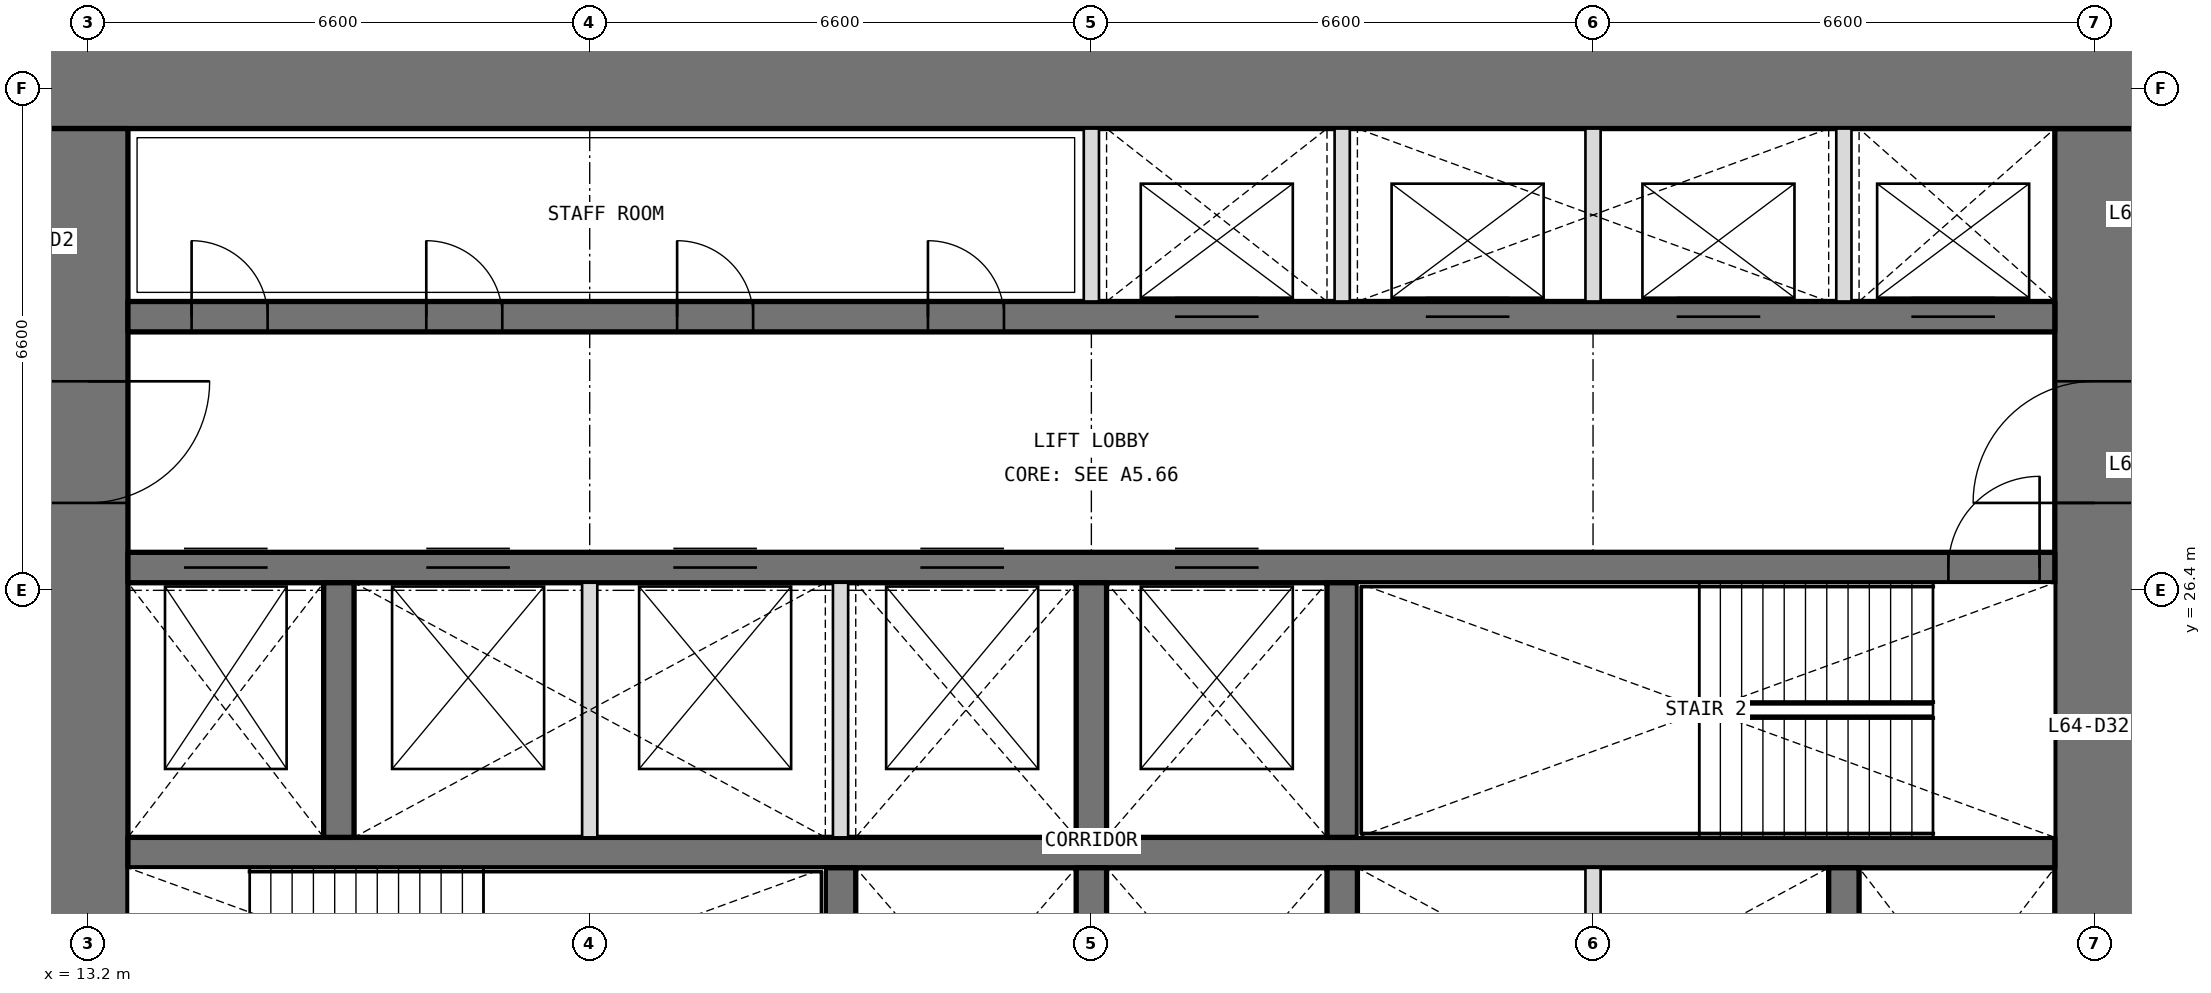
"""IFC4 building model, lengths in metres.
Left out: names, types, materials, properties, quantities, classifications, styles, units other than length and angle.
Written with IfcOpenShell. Run it as: python <this file> out.ifc"""

import sys

from ifc_helpers import new_model, si_unit, direction, frame, frame_2d, origin, place, context, subcontext, project, spatial, rectangle, extrude, element, fill, save


model = new_model("IFC4")
c1 = context("Model", 3, precision=1e-05, world=origin(), true_north=direction((0.0, 1.0)))
c2 = subcontext(c1, "Body", "Model", "MODEL_VIEW")
j1 = project(units=[si_unit("LENGTHUNIT", "METRE"), si_unit("PLANEANGLEUNIT", "RADIAN")], contexts=[c1])
p1 = place(None, origin())
s1 = spatial("IfcSite", under=j1, at=p1, CompositionType="ELEMENT")
p2 = place(p1, origin())
s2 = spatial("IfcBuilding", under=s1, at=p2, CompositionType="ELEMENT")
p3 = place(p2, frame((0.0, 0.0, 279.6)))
s3 = spatial("IfcBuildingStorey", under=s2, at=p3, CompositionType="ELEMENT", Elevation=279.6)
p4 = place(p3, frame((39.6, 13.725, 0.0), z_axis=(0.0, 0.0, 1.0), x_axis=(0.0, 1.0, 0.0)))
e1 = element("IfcWall", 1, at=p4, inside=s3, PredefinedType="SHEAR", context=c2, shape_type="SweptSolid", body=[
    extrude(rectangle(XDim=18.75, YDim=1.05, at=frame_2d((9.375, 0.0))), origin(), (0.0, 0.0, 1.0), 4.2),
])
p5 = place(p4, frame((3.025, 0.0, 0.0)))
e2 = element("IfcOpeningElement", 2, at=p5, cuts=e1, PredefinedType="OPENING", context=c2, shape_type="SweptSolid", body=[
    extrude(rectangle(XDim=1.6, YDim=2.1, at=frame_2d((0.8, 1.05))), frame((0.0, 0.535, 0.0), z_axis=(0.0, -1.0, 0.0), x_axis=(1.0, 0.0, 0.0)), (0.0, 0.0, 1.0), 1.07),
])
p6 = place(p4, frame((13.825, 0.0, 0.0)))
e3 = element("IfcOpeningElement", 3, at=p6, cuts=e1, PredefinedType="OPENING", context=c2, shape_type="SweptSolid", body=[
    extrude(rectangle(XDim=1.6, YDim=2.1, at=frame_2d((0.8, 1.05))), frame((0.0, 0.535, 0.0), z_axis=(0.0, -1.0, 0.0), x_axis=(1.0, 0.0, 0.0)), (0.0, 0.0, 1.0), 1.07),
])
p7 = place(p3, frame((40.125, 33.0, 0.0), z_axis=(0.0, 0.0, 1.0), x_axis=(-1.0, 0.0, 0.0)))
e4 = element("IfcWall", 4, at=p7, inside=s3, PredefinedType="SHEAR", context=c2, shape_type="SweptSolid", body=[
    extrude(rectangle(XDim=27.45, YDim=1.05, at=frame_2d((13.725, 0.0))), origin(), (0.0, 0.0, 1.0), 4.2),
])
p8 = place(p3, frame((13.2, 32.475, 0.0), z_axis=(0.0, 0.0, 1.0), x_axis=(0.0, -1.0, 0.0)))
e5 = element("IfcWall", 5, at=p8, inside=s3, PredefinedType="SHEAR", context=c2, shape_type="SweptSolid", body=[
    extrude(rectangle(XDim=18.75, YDim=1.05, at=frame_2d((9.375, 0.0))), origin(), (0.0, 0.0, 1.0), 4.2),
])
p9 = place(p8, frame((14.125, 0.0, 0.0)))
e6 = element("IfcOpeningElement", 6, at=p9, cuts=e5, PredefinedType="OPENING", context=c2, shape_type="SweptSolid", body=[
    extrude(rectangle(XDim=1.6, YDim=2.1, at=frame_2d((0.8, 1.05))), frame((0.0, 0.535, 0.0), z_axis=(0.0, -1.0, 0.0), x_axis=(1.0, 0.0, 0.0)), (0.0, 0.0, 1.0), 1.07),
])
p10 = place(p8, frame((3.325, 0.0, 0.0)))
e7 = element("IfcOpeningElement", 7, at=p10, cuts=e5, PredefinedType="OPENING", context=c2, shape_type="SweptSolid", body=[
    extrude(rectangle(XDim=1.6, YDim=2.1, at=frame_2d((0.8, 1.05))), frame((0.0, 0.535, 0.0), z_axis=(0.0, -1.0, 0.0), x_axis=(1.0, 0.0, 0.0)), (0.0, 0.0, 1.0), 1.07),
])
p11 = place(p3, frame((13.725, 22.95, 0.0), z_axis=(0.0, 0.0, 1.0), x_axis=(1.0, 0.0, 0.0)))
e8 = element("IfcWall", 8, at=p11, inside=s3, PredefinedType="SHEAR", context=c2, shape_type="SweptSolid", body=[
    extrude(rectangle(XDim=25.35, YDim=0.4, at=frame_2d((12.675, 0.0))), origin(), (0.0, 0.0, 1.0), 4.2),
])
p12 = place(p3, frame((13.725, 26.7, 0.0), z_axis=(0.0, 0.0, 1.0), x_axis=(1.0, 0.0, 0.0)))
e9 = element("IfcWall", 9, at=p12, inside=s3, PredefinedType="SHEAR", context=c2, shape_type="SweptSolid", body=[
    extrude(rectangle(XDim=25.35, YDim=0.4, at=frame_2d((12.675, 0.0))), origin(), (0.0, 0.0, 1.0), 4.2),
])
p13 = place(p12, frame((23.95, 0.0, 0.0)))
e10 = element("IfcOpeningElement", 10, at=p13, cuts=e9, PredefinedType="OPENING", context=c2, shape_type="SweptSolid", body=[
    extrude(rectangle(XDim=1.2, YDim=2.1, at=frame_2d((0.6, 1.05))), frame((0.0, 0.21, 0.0), z_axis=(0.0, -1.0, 0.0), x_axis=(1.0, 0.0, 0.0)), (0.0, 0.0, 1.0), 0.42),
])
p14 = place(p12, frame((0.738, 0.0, 0.0)))
e11 = element("IfcOpeningElement", 11, at=p14, cuts=e9, PredefinedType="OPENING", context=c2, shape_type="SweptSolid", body=[
    extrude(rectangle(XDim=1.1, YDim=2.1, at=frame_2d((0.55, 1.05))), frame((0.0, 0.21, 0.0), z_axis=(0.0, -1.0, 0.0), x_axis=(1.0, 0.0, 0.0)), (0.0, 0.0, 1.0), 0.42),
])
p15 = place(p12, frame((3.925, 0.0, 0.0)))
e12 = element("IfcOpeningElement", 12, at=p15, cuts=e9, PredefinedType="OPENING", context=c2, shape_type="SweptSolid", body=[
    extrude(rectangle(XDim=1.1, YDim=2.1, at=frame_2d((0.55, 1.05))), frame((0.0, 0.21, 0.0), z_axis=(0.0, -1.0, 0.0), x_axis=(1.0, 0.0, 0.0)), (0.0, 0.0, 1.0), 0.42),
])
p16 = place(p12, frame((7.175, 0.0, 0.0)))
e13 = element("IfcOpeningElement", 13, at=p16, cuts=e9, PredefinedType="OPENING", context=c2, shape_type="SweptSolid", body=[
    extrude(rectangle(XDim=1.1, YDim=2.1, at=frame_2d((0.55, 1.05))), frame((0.0, 0.21, 0.0), z_axis=(0.0, -1.0, 0.0), x_axis=(1.0, 0.0, 0.0)), (0.0, 0.0, 1.0), 0.42),
])
p17 = place(p12, frame((10.425, 0.0, 0.0)))
e14 = element("IfcOpeningElement", 14, at=p17, cuts=e9, PredefinedType="OPENING", context=c2, shape_type="SweptSolid", body=[
    extrude(rectangle(XDim=1.1, YDim=2.1, at=frame_2d((0.55, 1.05))), frame((0.0, 0.21, 0.0), z_axis=(0.0, -1.0, 0.0), x_axis=(1.0, 0.0, 0.0)), (0.0, 0.0, 1.0), 0.42),
])
p18 = place(p12, frame((13.775, 0.0, 0.0)))
e15 = element("IfcOpeningElement", 15, at=p18, cuts=e9, PredefinedType="OPENING", context=c2, shape_type="SweptSolid", body=[
    extrude(rectangle(XDim=1.1, YDim=2.1, at=frame_2d((0.55, 1.05))), frame((0.0, 0.21, 0.0), z_axis=(0.0, -1.0, 0.0), x_axis=(1.0, 0.0, 0.0)), (0.0, 0.0, 1.0), 0.42),
])
p19 = place(p3, frame((13.725, 30.0, 0.0), z_axis=(0.0, 0.0, 1.0), x_axis=(1.0, 0.0, 0.0)))
e16 = element("IfcWall", 16, at=p19, inside=s3, PredefinedType="SHEAR", context=c2, shape_type="SweptSolid", body=[
    extrude(rectangle(XDim=25.35, YDim=0.4, at=frame_2d((12.675, 0.0))), origin(), (0.0, 0.0, 1.0), 4.2),
])
p20 = place(p19, frame((0.837, 0.0, 0.0)))
e17 = element("IfcOpeningElement", 17, at=p20, cuts=e16, PredefinedType="OPENING", context=c2, shape_type="SweptSolid", body=[
    extrude(rectangle(XDim=1.0, YDim=2.1, at=frame_2d((0.5, 1.05))), frame((0.0, 0.21, 0.0), z_axis=(0.0, -1.0, 0.0), x_axis=(1.0, 0.0, 0.0)), (0.0, 0.0, 1.0), 0.42),
])
p21 = place(p19, frame((3.925, 0.0, 0.0)))
e18 = element("IfcOpeningElement", 18, at=p21, cuts=e16, PredefinedType="OPENING", context=c2, shape_type="SweptSolid", body=[
    extrude(rectangle(XDim=1.0, YDim=2.1, at=frame_2d((0.5, 1.05))), frame((0.0, 0.21, 0.0), z_axis=(0.0, -1.0, 0.0), x_axis=(1.0, 0.0, 0.0)), (0.0, 0.0, 1.0), 0.42),
])
p22 = place(p19, frame((7.225, 0.0, 0.0)))
e19 = element("IfcOpeningElement", 19, at=p22, cuts=e16, PredefinedType="OPENING", context=c2, shape_type="SweptSolid", body=[
    extrude(rectangle(XDim=1.0, YDim=2.1, at=frame_2d((0.5, 1.05))), frame((0.0, 0.21, 0.0), z_axis=(0.0, -1.0, 0.0), x_axis=(1.0, 0.0, 0.0)), (0.0, 0.0, 1.0), 0.42),
])
p23 = place(p19, frame((10.525, 0.0, 0.0)))
e20 = element("IfcOpeningElement", 20, at=p23, cuts=e16, PredefinedType="OPENING", context=c2, shape_type="SweptSolid", body=[
    extrude(rectangle(XDim=1.0, YDim=2.1, at=frame_2d((0.5, 1.05))), frame((0.0, 0.21, 0.0), z_axis=(0.0, -1.0, 0.0), x_axis=(1.0, 0.0, 0.0)), (0.0, 0.0, 1.0), 0.42),
])
p24 = place(p19, frame((13.775, 0.0, 0.0)))
e21 = element("IfcOpeningElement", 21, at=p24, cuts=e16, PredefinedType="OPENING", context=c2, shape_type="SweptSolid", body=[
    extrude(rectangle(XDim=1.1, YDim=2.1, at=frame_2d((0.55, 1.05))), frame((0.0, 0.21, 0.0), z_axis=(0.0, -1.0, 0.0), x_axis=(1.0, 0.0, 0.0)), (0.0, 0.0, 1.0), 0.42),
])
p25 = place(p19, frame((17.075, 0.0, 0.0)))
e22 = element("IfcOpeningElement", 22, at=p25, cuts=e16, PredefinedType="OPENING", context=c2, shape_type="SweptSolid", body=[
    extrude(rectangle(XDim=1.1, YDim=2.1, at=frame_2d((0.55, 1.05))), frame((0.0, 0.21, 0.0), z_axis=(0.0, -1.0, 0.0), x_axis=(1.0, 0.0, 0.0)), (0.0, 0.0, 1.0), 0.42),
])
p26 = place(p19, frame((20.375, 0.0, 0.0)))
e23 = element("IfcOpeningElement", 23, at=p26, cuts=e16, PredefinedType="OPENING", context=c2, shape_type="SweptSolid", body=[
    extrude(rectangle(XDim=1.1, YDim=2.1, at=frame_2d((0.55, 1.05))), frame((0.0, 0.21, 0.0), z_axis=(0.0, -1.0, 0.0), x_axis=(1.0, 0.0, 0.0)), (0.0, 0.0, 1.0), 0.42),
])
p27 = place(p19, frame((23.462, 0.0, 0.0)))
e24 = element("IfcOpeningElement", 24, at=p27, cuts=e16, PredefinedType="OPENING", context=c2, shape_type="SweptSolid", body=[
    extrude(rectangle(XDim=1.1, YDim=2.1, at=frame_2d((0.55, 1.05))), frame((0.0, 0.21, 0.0), z_axis=(0.0, -1.0, 0.0), x_axis=(1.0, 0.0, 0.0)), (0.0, 0.0, 1.0), 0.42),
])
for number, where, z_axis, x_axis in (
    (25, (23.1, 19.4, 0.0), (0.0, 0.0, 1.0), (0.0, 1.0, 0.0)),
    (26, (26.4, 19.4, 0.0), (0.0, 0.0, 1.0), (0.0, 1.0, 0.0)),
    (27, (29.7, 19.4, 0.0), (0.0, 0.0, 1.0), (0.0, 1.0, 0.0)),
    (28, (36.3, 19.4, 0.0), (0.0, 0.0, 1.0), (0.0, 1.0, 0.0)),
    (29, (16.5, 23.15, 0.0), (0.0, 0.0, 1.0), (0.0, 1.0, 0.0)),
    (30, (26.4, 23.15, 0.0), (0.0, 0.0, 1.0), (0.0, 1.0, 0.0)),
    (31, (29.7, 23.15, 0.0), (0.0, 0.0, 1.0), (0.0, 1.0, 0.0)),
):
    element("IfcWall", number, at=place(p3, frame(where, z_axis=z_axis, x_axis=x_axis)), inside=s3, PredefinedType="SHEAR", context=c2, shape_type="SweptSolid", body=[
        extrude(rectangle(XDim=3.35, YDim=0.4, at=frame_2d((1.675, 0.0))), origin(), (0.0, 0.0, 1.0), 4.2),
    ])
for number, where, z_axis, x_axis in (
    (32, (26.4, 30.2, 0.0), (0.0, 0.0, 1.0), (0.0, 1.0, 0.0)),
    (33, (29.7, 30.2, 0.0), (0.0, 0.0, 1.0), (0.0, 1.0, 0.0)),
    (34, (33.0, 30.2, 0.0), (0.0, 0.0, 1.0), (0.0, 1.0, 0.0)),
    (35, (36.3, 30.2, 0.0), (0.0, 0.0, 1.0), (0.0, 1.0, 0.0)),
):
    element("IfcWall", number, at=place(p3, frame(where, z_axis=z_axis, x_axis=x_axis)), inside=s3, PredefinedType="PARTITIONING", context=c2, shape_type="SweptSolid", body=[
        extrude(rectangle(XDim=2.275, YDim=0.2, at=frame_2d((1.138, 0.0))), origin(), (0.0, 0.0, 1.0), 4.2),
    ])
for number, where, z_axis, x_axis in (
    (36, (33.0, 19.4, 0.0), (0.0, 0.0, 1.0), (0.0, 1.0, 0.0)),
    (37, (19.8, 23.15, 0.0), (0.0, 0.0, 1.0), (0.0, 1.0, 0.0)),
    (38, (23.1, 23.15, 0.0), (0.0, 0.0, 1.0), (0.0, 1.0, 0.0)),
):
    element("IfcWall", number, at=place(p3, frame(where, z_axis=z_axis, x_axis=x_axis)), inside=s3, PredefinedType="PARTITIONING", context=c2, shape_type="SweptSolid", body=[
        extrude(rectangle(XDim=3.35, YDim=0.2, at=frame_2d((1.675, 0.0))), origin(), (0.0, 0.0, 1.0), 4.2),
    ])
p28 = place(p20, origin())
e39 = element("IfcDoor", 39, at=p28, inside=s3, OperationType="SINGLE_SWING_LEFT", PredefinedType="DOOR", context=c2, shape_type="SweptSolid", body=[
    extrude(rectangle(XDim=1.0, YDim=2.1, at=frame_2d((0.5, 1.05))), frame((0.0, 0.025, 0.0), z_axis=(0.0, -1.0, 0.0), x_axis=(1.0, 0.0, 0.0)), (0.0, 0.0, 1.0), 0.05),
])
fill(e17, e39)
p29 = place(p21, origin())
e40 = element("IfcDoor", 40, at=p29, inside=s3, OperationType="SINGLE_SWING_LEFT", PredefinedType="DOOR", context=c2, shape_type="SweptSolid", body=[
    extrude(rectangle(XDim=1.0, YDim=2.1, at=frame_2d((0.5, 1.05))), frame((0.0, 0.025, 0.0), z_axis=(0.0, -1.0, 0.0), x_axis=(1.0, 0.0, 0.0)), (0.0, 0.0, 1.0), 0.05),
])
fill(e18, e40)
p30 = place(p22, origin())
e41 = element("IfcDoor", 41, at=p30, inside=s3, OperationType="SINGLE_SWING_LEFT", PredefinedType="DOOR", context=c2, shape_type="SweptSolid", body=[
    extrude(rectangle(XDim=1.0, YDim=2.1, at=frame_2d((0.5, 1.05))), frame((0.0, 0.025, 0.0), z_axis=(0.0, -1.0, 0.0), x_axis=(1.0, 0.0, 0.0)), (0.0, 0.0, 1.0), 0.05),
])
fill(e19, e41)
p31 = place(p23, origin())
e42 = element("IfcDoor", 42, at=p31, inside=s3, OperationType="SINGLE_SWING_LEFT", PredefinedType="DOOR", context=c2, shape_type="SweptSolid", body=[
    extrude(rectangle(XDim=1.0, YDim=2.1, at=frame_2d((0.5, 1.05))), frame((0.0, 0.025, 0.0), z_axis=(0.0, -1.0, 0.0), x_axis=(1.0, 0.0, 0.0)), (0.0, 0.0, 1.0), 0.05),
])
fill(e20, e42)
p32 = place(p13, origin())
e43 = element("IfcDoor", 43, at=p32, inside=s3, OperationType="SINGLE_SWING_RIGHT", PredefinedType="DOOR", context=c2, shape_type="SweptSolid", body=[
    extrude(rectangle(XDim=1.2, YDim=2.1, at=frame_2d((0.6, 1.05))), frame((0.0, 0.025, 0.0), z_axis=(0.0, -1.0, 0.0), x_axis=(1.0, 0.0, 0.0)), (0.0, 0.0, 1.0), 0.05),
])
fill(e10, e43)
p33 = place(p10, origin())
e44 = element("IfcDoor", 44, at=p33, inside=s3, OperationType="DOUBLE_DOOR_DOUBLE_SWING", PredefinedType="DOOR", context=c2, shape_type="SweptSolid", body=[
    extrude(rectangle(XDim=1.6, YDim=2.1, at=frame_2d((0.8, 1.05))), frame((0.0, 0.025, 0.0), z_axis=(0.0, -1.0, 0.0), x_axis=(1.0, 0.0, 0.0)), (0.0, 0.0, 1.0), 0.05),
])
fill(e7, e44)
p34 = place(p6, origin())
e45 = element("IfcDoor", 45, at=p34, inside=s3, OperationType="DOUBLE_DOOR_DOUBLE_SWING", PredefinedType="DOOR", context=c2, shape_type="SweptSolid", body=[
    extrude(rectangle(XDim=1.6, YDim=2.1, at=frame_2d((0.8, 1.05))), frame((0.0, 0.025, 0.0), z_axis=(0.0, -1.0, 0.0), x_axis=(1.0, 0.0, 0.0)), (0.0, 0.0, 1.0), 0.05),
])
fill(e3, e45)
p35 = place(p24, origin())
e46 = element("IfcDoor", 46, at=p35, inside=s3, OperationType="DOUBLE_DOOR_SLIDING", PredefinedType="DOOR", context=c2, shape_type="SweptSolid", body=[
    extrude(rectangle(XDim=1.1, YDim=2.1, at=frame_2d((0.55, 1.05))), frame((0.0, 0.025, 0.0), z_axis=(0.0, -1.0, 0.0), x_axis=(1.0, 0.0, 0.0)), (0.0, 0.0, 1.0), 0.05),
])
fill(e21, e46)
p36 = place(p25, origin())
e47 = element("IfcDoor", 47, at=p36, inside=s3, OperationType="DOUBLE_DOOR_SLIDING", PredefinedType="DOOR", context=c2, shape_type="SweptSolid", body=[
    extrude(rectangle(XDim=1.1, YDim=2.1, at=frame_2d((0.55, 1.05))), frame((0.0, 0.025, 0.0), z_axis=(0.0, -1.0, 0.0), x_axis=(1.0, 0.0, 0.0)), (0.0, 0.0, 1.0), 0.05),
])
fill(e22, e47)
p37 = place(p26, origin())
e48 = element("IfcDoor", 48, at=p37, inside=s3, OperationType="DOUBLE_DOOR_SLIDING", PredefinedType="DOOR", context=c2, shape_type="SweptSolid", body=[
    extrude(rectangle(XDim=1.1, YDim=2.1, at=frame_2d((0.55, 1.05))), frame((0.0, 0.025, 0.0), z_axis=(0.0, -1.0, 0.0), x_axis=(1.0, 0.0, 0.0)), (0.0, 0.0, 1.0), 0.05),
])
fill(e23, e48)
p38 = place(p27, origin())
e49 = element("IfcDoor", 49, at=p38, inside=s3, OperationType="DOUBLE_DOOR_SLIDING", PredefinedType="DOOR", context=c2, shape_type="SweptSolid", body=[
    extrude(rectangle(XDim=1.1, YDim=2.1, at=frame_2d((0.55, 1.05))), frame((0.0, 0.025, 0.0), z_axis=(0.0, -1.0, 0.0), x_axis=(1.0, 0.0, 0.0)), (0.0, 0.0, 1.0), 0.05),
])
fill(e24, e49)
p39 = place(p14, origin())
e50 = element("IfcDoor", 50, at=p39, inside=s3, OperationType="DOUBLE_DOOR_SLIDING", PredefinedType="DOOR", context=c2, shape_type="SweptSolid", body=[
    extrude(rectangle(XDim=1.1, YDim=2.1, at=frame_2d((0.55, 1.05))), frame((0.0, 0.025, 0.0), z_axis=(0.0, -1.0, 0.0), x_axis=(1.0, 0.0, 0.0)), (0.0, 0.0, 1.0), 0.05),
])
fill(e11, e50)
p40 = place(p15, origin())
e51 = element("IfcDoor", 51, at=p40, inside=s3, OperationType="DOUBLE_DOOR_SLIDING", PredefinedType="DOOR", context=c2, shape_type="SweptSolid", body=[
    extrude(rectangle(XDim=1.1, YDim=2.1, at=frame_2d((0.55, 1.05))), frame((0.0, 0.025, 0.0), z_axis=(0.0, -1.0, 0.0), x_axis=(1.0, 0.0, 0.0)), (0.0, 0.0, 1.0), 0.05),
])
fill(e12, e51)
p41 = place(p16, origin())
e52 = element("IfcDoor", 52, at=p41, inside=s3, OperationType="DOUBLE_DOOR_SLIDING", PredefinedType="DOOR", context=c2, shape_type="SweptSolid", body=[
    extrude(rectangle(XDim=1.1, YDim=2.1, at=frame_2d((0.55, 1.05))), frame((0.0, 0.025, 0.0), z_axis=(0.0, -1.0, 0.0), x_axis=(1.0, 0.0, 0.0)), (0.0, 0.0, 1.0), 0.05),
])
fill(e13, e52)
p42 = place(p17, origin())
e53 = element("IfcDoor", 53, at=p42, inside=s3, OperationType="DOUBLE_DOOR_SLIDING", PredefinedType="DOOR", context=c2, shape_type="SweptSolid", body=[
    extrude(rectangle(XDim=1.1, YDim=2.1, at=frame_2d((0.55, 1.05))), frame((0.0, 0.025, 0.0), z_axis=(0.0, -1.0, 0.0), x_axis=(1.0, 0.0, 0.0)), (0.0, 0.0, 1.0), 0.05),
])
fill(e14, e53)
p43 = place(p18, origin())
e54 = element("IfcDoor", 54, at=p43, inside=s3, OperationType="DOUBLE_DOOR_SLIDING", PredefinedType="DOOR", context=c2, shape_type="SweptSolid", body=[
    extrude(rectangle(XDim=1.1, YDim=2.1, at=frame_2d((0.55, 1.05))), frame((0.0, 0.025, 0.0), z_axis=(0.0, -1.0, 0.0), x_axis=(1.0, 0.0, 0.0)), (0.0, 0.0, 1.0), 0.05),
])
fill(e15, e54)
save(model, sys.argv[1])
